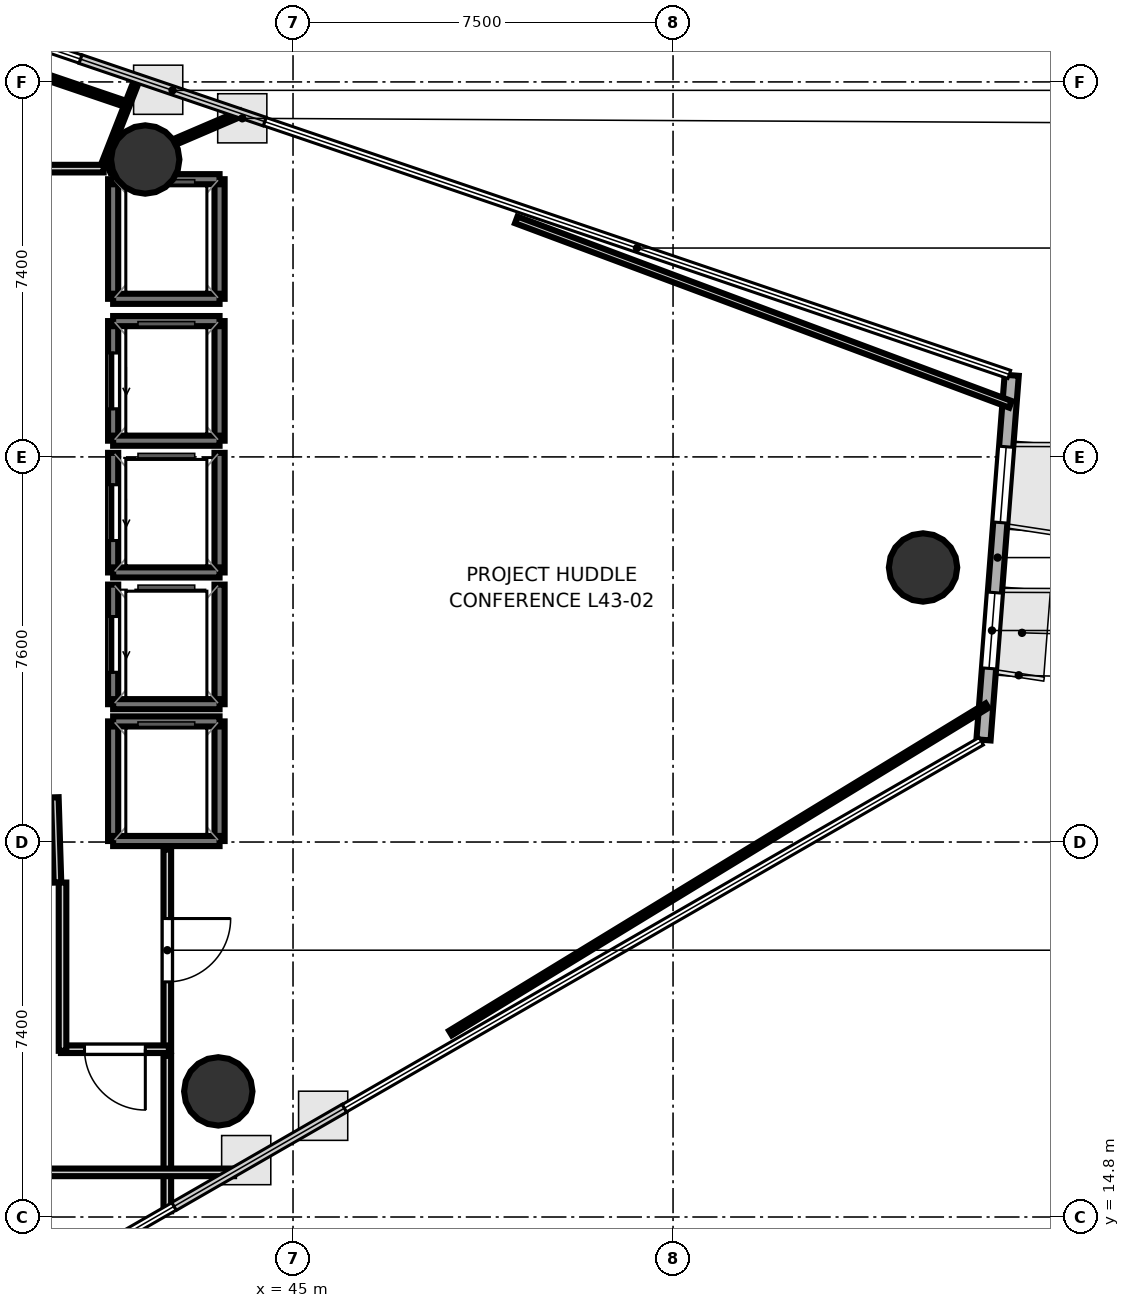
"""IFC4 building model, lengths in metres.
Left out: names, types, materials, properties, quantities, classifications, styles, units other than length and angle.
Written with IfcOpenShell. Run it as: python <this file> out.ifc"""

import sys

from ifc_helpers import new_model, si_unit, direction, frame, frame_2d, origin, origin_2d, place, context, subcontext, project, spatial, rectangle, hollow_circle, extrude, element, fill, save


model = new_model("IFC4")
c1 = context("Model", 3, precision=1e-05, world=origin(), true_north=direction((0.0, 1.0)))
c2 = subcontext(c1, "Body", "Model", "MODEL_VIEW")
j1 = project(units=[si_unit("LENGTHUNIT", "METRE"), si_unit("PLANEANGLEUNIT", "RADIAN")], contexts=[c1])
p1 = place(None, origin())
s1 = spatial("IfcSite", under=j1, at=p1, CompositionType="ELEMENT")
p2 = place(p1, origin())
s2 = spatial("IfcBuilding", under=s1, at=p2, CompositionType="ELEMENT")
p3 = place(p2, frame((0.0, 0.0, 169.8)))
s3 = spatial("IfcBuildingStorey", under=s2, at=p3, CompositionType="ELEMENT", Elevation=169.8)
for number, where, z_axis, x_axis in (
    (1, (57.434, 27.618, 0.0), (0.0, 0.0, 1.0), (1.0, 0.0, 0.0)),
    (2, (42.083, 35.669, 0.0), (0.0, 0.0, 1.0), (1.0, 0.0, 0.0)),
    (3, (43.525, 17.279, 0.0), (0.0, 0.0, 1.0), (1.0, 0.0, 0.0)),
):
    element("IfcColumn", number, at=place(p3, frame(where, z_axis=z_axis, x_axis=x_axis)), inside=s3, PredefinedType="COLUMN", context=c2, shape_type="SweptSolid", body=[
        extrude(hollow_circle(Radius=0.675, WallThickness=0.032, at=origin_2d()), origin(), (0.0, 0.0, 1.0), 3.7),
    ])
p4 = place(p3, frame((58.627, 24.215, 0.0), z_axis=(0.0, 0.0, 1.0), x_axis=(0.077128498834, 0.997021160592, 0.0)))
e4 = element("IfcWall", 4, at=p4, inside=s3, PredefinedType="SOLIDWALL", context=c2, shape_type="SweptSolid", body=[
    extrude(rectangle(XDim=7.217, YDim=0.28, at=frame_2d((3.608, 0.0))), origin(), (0.0, 0.0, 1.0), 3.52),
])
p5 = place(p4, frame((1.415, 0.0, 0.85)))
e5 = element("IfcOpeningElement", 5, at=p5, cuts=e4, PredefinedType="OPENING", context=c2, shape_type="SweptSolid", body=[
    extrude(rectangle(XDim=1.5, YDim=2.1, at=frame_2d((0.75, 1.05))), frame((0.0, 0.15, 0.0), z_axis=(0.0, -1.0, 0.0), x_axis=(1.0, 0.0, 0.0)), (0.0, 0.0, 1.0), 0.3),
])
p6 = place(p4, frame((4.302, 0.0, 0.85)))
e6 = element("IfcOpeningElement", 6, at=p6, cuts=e4, PredefinedType="OPENING", context=c2, shape_type="SweptSolid", body=[
    extrude(rectangle(XDim=1.5, YDim=2.1, at=frame_2d((0.75, 1.05))), frame((0.0, 0.15, 0.0), z_axis=(0.0, -1.0, 0.0), x_axis=(1.0, 0.0, 0.0)), (0.0, 0.0, 1.0), 0.3),
])
p7 = place(p3, frame((43.55, 30.12, 0.0), z_axis=(0.0, 0.0, 1.0), x_axis=(0.0, 1.0, 0.0)))
e7 = element("IfcWall", 7, at=p7, inside=s3, PredefinedType="SOLIDWALL", context=c2, shape_type="SweptSolid", body=[
    extrude(rectangle(XDim=2.36, YDim=0.2, at=frame_2d((1.18, 0.0))), origin(), (0.0, 0.0, 1.0), 3.52),
])
p8 = place(p3, frame((41.45, 30.12, 0.0), z_axis=(0.0, 0.0, 1.0), x_axis=(0.0, 1.0, 0.0)))
e8 = element("IfcWall", 8, at=p8, inside=s3, PredefinedType="SOLIDWALL", context=c2, shape_type="SweptSolid", body=[
    extrude(rectangle(XDim=2.36, YDim=0.2, at=frame_2d((1.18, 0.0))), origin(), (0.0, 0.0, 1.0), 3.52),
])
p9 = place(p8, frame((0.63, 0.0, 0.0)))
e9 = element("IfcOpeningElement", 9, at=p9, cuts=e8, PredefinedType="OPENING", context=c2, shape_type="SweptSolid", body=[
    extrude(rectangle(XDim=1.1, YDim=2.15, at=frame_2d((0.55, 1.075))), frame((0.0, 0.11, 0.0), z_axis=(0.0, -1.0, 0.0), x_axis=(1.0, 0.0, 0.0)), (0.0, 0.0, 1.0), 0.22),
])
for number, where, z_axis, x_axis in (
    (10, (41.45, 32.48, 0.0), (0.0, 0.0, 1.0), (1.0, 0.0, 0.0)),
    (11, (41.45, 30.12, 0.0), (0.0, 0.0, 1.0), (1.0, 0.0, 0.0)),
):
    element("IfcWall", number, at=place(p3, frame(where, z_axis=z_axis, x_axis=x_axis)), inside=s3, PredefinedType="SOLIDWALL", context=c2, shape_type="SweptSolid", body=[
        extrude(rectangle(XDim=2.1, YDim=0.2, at=frame_2d((1.05, 0.0))), origin(), (0.0, 0.0, 1.0), 3.52),
    ])
p10 = place(p3, frame((43.55, 27.52, 0.0), z_axis=(0.0, 0.0, 1.0), x_axis=(0.0, 1.0, 0.0)))
e12 = element("IfcWall", 12, at=p10, inside=s3, PredefinedType="SOLIDWALL", context=c2, shape_type="SweptSolid", body=[
    extrude(rectangle(XDim=2.36, YDim=0.2, at=frame_2d((1.18, 0.0))), origin(), (0.0, 0.0, 1.0), 3.52),
])
p11 = place(p3, frame((41.45, 27.52, 0.0), z_axis=(0.0, 0.0, 1.0), x_axis=(0.0, 1.0, 0.0)))
e13 = element("IfcWall", 13, at=p11, inside=s3, PredefinedType="SOLIDWALL", context=c2, shape_type="SweptSolid", body=[
    extrude(rectangle(XDim=2.36, YDim=0.2, at=frame_2d((1.18, 0.0))), origin(), (0.0, 0.0, 1.0), 3.52),
])
p12 = place(p11, frame((0.63, 0.0, 0.0)))
e14 = element("IfcOpeningElement", 14, at=p12, cuts=e13, PredefinedType="OPENING", context=c2, shape_type="SweptSolid", body=[
    extrude(rectangle(XDim=1.1, YDim=2.15, at=frame_2d((0.55, 1.075))), frame((0.0, 0.11, 0.0), z_axis=(0.0, -1.0, 0.0), x_axis=(1.0, 0.0, 0.0)), (0.0, 0.0, 1.0), 0.22),
])
p13 = place(p3, frame((41.45, 27.52, 0.0), z_axis=(0.0, 0.0, 1.0), x_axis=(1.0, 0.0, 0.0)))
e15 = element("IfcWall", 15, at=p13, inside=s3, PredefinedType="SOLIDWALL", context=c2, shape_type="SweptSolid", body=[
    extrude(rectangle(XDim=2.1, YDim=0.2, at=frame_2d((1.05, 0.0))), origin(), (0.0, 0.0, 1.0), 3.52),
])
p14 = place(p3, frame((43.55, 24.92, 0.0), z_axis=(0.0, 0.0, 1.0), x_axis=(0.0, 1.0, 0.0)))
e16 = element("IfcWall", 16, at=p14, inside=s3, PredefinedType="SOLIDWALL", context=c2, shape_type="SweptSolid", body=[
    extrude(rectangle(XDim=2.36, YDim=0.2, at=frame_2d((1.18, 0.0))), origin(), (0.0, 0.0, 1.0), 3.52),
])
p15 = place(p3, frame((41.45, 24.92, 0.0), z_axis=(0.0, 0.0, 1.0), x_axis=(0.0, 1.0, 0.0)))
e17 = element("IfcWall", 17, at=p15, inside=s3, PredefinedType="SOLIDWALL", context=c2, shape_type="SweptSolid", body=[
    extrude(rectangle(XDim=2.36, YDim=0.2, at=frame_2d((1.18, 0.0))), origin(), (0.0, 0.0, 1.0), 3.52),
])
p16 = place(p15, frame((0.63, 0.0, 0.0)))
e18 = element("IfcOpeningElement", 18, at=p16, cuts=e17, PredefinedType="OPENING", context=c2, shape_type="SweptSolid", body=[
    extrude(rectangle(XDim=1.1, YDim=2.15, at=frame_2d((0.55, 1.075))), frame((0.0, 0.11, 0.0), z_axis=(0.0, -1.0, 0.0), x_axis=(1.0, 0.0, 0.0)), (0.0, 0.0, 1.0), 0.22),
])
p17 = place(p3, frame((41.45, 24.92, 0.0), z_axis=(0.0, 0.0, 1.0), x_axis=(1.0, 0.0, 0.0)))
e19 = element("IfcWall", 19, at=p17, inside=s3, PredefinedType="SOLIDWALL", context=c2, shape_type="SweptSolid", body=[
    extrude(rectangle(XDim=2.1, YDim=0.2, at=frame_2d((1.05, 0.0))), origin(), (0.0, 0.0, 1.0), 3.52),
])
for number, where, z_axis, x_axis in (
    (20, (43.55, 22.22, 0.0), (0.0, 0.0, 1.0), (0.0, 1.0, 0.0)),
    (21, (41.45, 22.22, 0.0), (0.0, 0.0, 1.0), (0.0, 1.0, 0.0)),
):
    element("IfcWall", number, at=place(p3, frame(where, z_axis=z_axis, x_axis=x_axis)), inside=s3, PredefinedType="SOLIDWALL", context=c2, shape_type="SweptSolid", body=[
        extrude(rectangle(XDim=2.36, YDim=0.2, at=frame_2d((1.18, 0.0))), origin(), (0.0, 0.0, 1.0), 3.52),
    ])
for number, where, z_axis, x_axis in (
    (22, (41.45, 24.58, 0.0), (0.0, 0.0, 1.0), (1.0, 0.0, 0.0)),
    (23, (41.45, 22.22, 0.0), (0.0, 0.0, 1.0), (1.0, 0.0, 0.0)),
):
    element("IfcWall", number, at=place(p3, frame(where, z_axis=z_axis, x_axis=x_axis)), inside=s3, PredefinedType="SOLIDWALL", context=c2, shape_type="SweptSolid", body=[
        extrude(rectangle(XDim=2.1, YDim=0.2, at=frame_2d((1.05, 0.0))), origin(), (0.0, 0.0, 1.0), 3.52),
    ])
for number, where, z_axis, x_axis in (
    (24, (43.55, 32.92, 0.0), (0.0, 0.0, 1.0), (0.0, 1.0, 0.0)),
    (25, (41.45, 32.92, 0.0), (0.0, 0.0, 1.0), (0.0, 1.0, 0.0)),
):
    element("IfcWall", number, at=place(p3, frame(where, z_axis=z_axis, x_axis=x_axis)), inside=s3, PredefinedType="SOLIDWALL", context=c2, shape_type="SweptSolid", body=[
        extrude(rectangle(XDim=2.36, YDim=0.2, at=frame_2d((1.18, 0.0))), origin(), (0.0, 0.0, 1.0), 3.52),
    ])
for number, where, z_axis, x_axis in (
    (26, (41.45, 35.28, 0.0), (0.0, 0.0, 1.0), (1.0, 0.0, 0.0)),
    (27, (41.45, 32.92, 0.0), (0.0, 0.0, 1.0), (1.0, 0.0, 0.0)),
):
    element("IfcWall", number, at=place(p3, frame(where, z_axis=z_axis, x_axis=x_axis)), inside=s3, PredefinedType="SOLIDWALL", context=c2, shape_type="SweptSolid", body=[
        extrude(rectangle(XDim=2.1, YDim=0.2, at=frame_2d((1.05, 0.0))), origin(), (0.0, 0.0, 1.0), 3.52),
    ])
p18 = place(p3, frame((40.351, 21.401, 0.0), z_axis=(0.0, 0.0, 1.0), x_axis=(-0.031058045979, 0.999517582527, 0.0)))
e28 = element("IfcWall", 28, at=p18, inside=s3, PredefinedType="PARTITIONING", context=c2, shape_type="SweptSolid", body=[
    extrude(rectangle(XDim=1.682, YDim=0.15, at=frame_2d((0.841, 0.0))), origin(), (0.0, 0.0, 1.0), 2.84),
])
p19 = place(p3, frame((39.88, 35.489, 0.0), z_axis=(0.0, 0.0, 1.0), x_axis=(1.0, 0.0, 0.0)))
e29 = element("IfcWall", 29, at=p19, inside=s3, PredefinedType="PARTITIONING", context=c2, shape_type="SweptSolid", body=[
    extrude(rectangle(XDim=1.383, YDim=0.15, at=frame_2d((0.691, 0.0))), origin(), (0.0, 0.0, 1.0), 2.84),
])
p20 = place(p3, frame((42.519, 22.05, 0.0), z_axis=(0.0, 0.0, 1.0), x_axis=(0.0, -1.0, 0.0)))
e30 = element("IfcWall", 30, at=p20, inside=s3, PredefinedType="PARTITIONING", context=c2, shape_type="SweptSolid", body=[
    extrude(rectangle(XDim=3.97, YDim=0.15, at=frame_2d((1.985, 0.0))), origin(), (0.0, 0.0, 1.0), 2.84),
])
p21 = place(p20, frame((1.36, 0.0, 0.0)))
e31 = element("IfcOpeningElement", 31, at=p21, cuts=e30, PredefinedType="OPENING", context=c2, shape_type="SweptSolid", body=[
    extrude(rectangle(XDim=1.25, YDim=2.2, at=frame_2d((0.625, 1.1))), frame((0.0, 0.085, 0.0), z_axis=(0.0, -1.0, 0.0), x_axis=(1.0, 0.0, 0.0)), (0.0, 0.0, 1.0), 0.17),
])
p22 = place(p3, frame((42.55, 18.111, 0.0), z_axis=(0.0, 0.0, 1.0), x_axis=(-1.0, 0.0, 0.0)))
e32 = element("IfcWall", 32, at=p22, inside=s3, PredefinedType="PARTITIONING", context=c2, shape_type="SweptSolid", body=[
    extrude(rectangle(XDim=2.13, YDim=0.15, at=frame_2d((1.065, 0.0))), origin(), (0.0, 0.0, 1.0), 2.84),
])
p23 = place(p22, frame((0.465, 0.0, 0.0)))
e33 = element("IfcOpeningElement", 33, at=p23, cuts=e32, PredefinedType="OPENING", context=c2, shape_type="SweptSolid", body=[
    extrude(rectangle(XDim=1.2, YDim=2.15, at=frame_2d((0.6, 1.075))), frame((0.0, 0.085, 0.0), z_axis=(0.0, -1.0, 0.0), x_axis=(1.0, 0.0, 0.0)), (0.0, 0.0, 1.0), 0.17),
])
p24 = place(p3, frame((40.451, 18.08, 0.0), z_axis=(0.0, 0.0, 1.0), x_axis=(0.0, 1.0, 0.0)))
e34 = element("IfcWall", 34, at=p24, inside=s3, PredefinedType="PARTITIONING", context=c2, shape_type="SweptSolid", body=[
    extrude(rectangle(XDim=3.32, YDim=0.15, at=frame_2d((1.66, 0.0))), origin(), (0.0, 0.0, 1.0), 2.84),
])
p25 = place(p3, frame((42.519, 17.98, 0.0), z_axis=(0.0, 0.0, 1.0), x_axis=(0.0, -1.0, 0.0)))
e35 = element("IfcWall", 35, at=p25, inside=s3, PredefinedType="PARTITIONING", context=c2, shape_type="SweptSolid", body=[
    extrude(rectangle(XDim=3.067, YDim=0.15, at=frame_2d((1.533, 0.0))), origin(), (0.0, 0.0, 1.0), 2.84),
])
p26 = place(p3, frame((43.837, 15.681, 0.0), z_axis=(0.0, 0.0, 1.0), x_axis=(-1.0, 0.0, 0.0)))
e36 = element("IfcWall", 36, at=p26, inside=s3, PredefinedType="PARTITIONING", context=c2, shape_type="SweptSolid", body=[
    extrude(rectangle(XDim=15.437, YDim=0.15, at=frame_2d((7.719, 0.0))), origin(), (0.0, 0.0, 1.0), 2.84),
])
p27 = place(p26, frame((8.993, 0.0, 0.0)))
e37 = element("IfcOpeningElement", 37, at=p27, cuts=e36, PredefinedType="OPENING", context=c2, shape_type="SweptSolid", body=[
    extrude(rectangle(XDim=1.25, YDim=2.2, at=frame_2d((0.625, 1.1))), frame((0.0, 0.085, 0.0), z_axis=(0.0, -1.0, 0.0), x_axis=(1.0, 0.0, 0.0)), (0.0, 0.0, 1.0), 0.17),
])
p28 = place(p3, frame((43.969, 36.576, 0.0), z_axis=(0.0, 0.0, 1.0), x_axis=(-0.919028863482, -0.394190243521, 0.0)))
e38 = element("IfcWall", 38, at=p28, inside=s3, PredefinedType="PARTITIONING", context=c2, shape_type="SweptSolid", body=[
    extrude(rectangle(XDim=2.827, YDim=0.12, at=frame_2d((1.414, 0.0))), origin(), (0.0, 0.0, 1.0), 2.84),
])
p29 = place(p3, frame((41.273, 35.589, 0.0), z_axis=(0.0, 0.0, 1.0), x_axis=(0.365105724435, 0.930966062746, 0.0)))
e39 = element("IfcWall", 39, at=p29, inside=s3, PredefinedType="PARTITIONING", context=c2, shape_type="SweptSolid", body=[
    extrude(rectangle(XDim=1.824, YDim=0.105, at=frame_2d((0.912, 0.0))), origin(), (0.0, 0.0, 1.0), 2.84),
])
p30 = place(p3, frame((49.405, 34.477, 0.0), z_axis=(0.0, 0.0, 1.0), x_axis=(0.936892733085, -0.349616942799, 0.0)))
e40 = element("IfcWall", 40, at=p30, inside=s3, PredefinedType="PARTITIONING", context=c2, shape_type="SweptSolid", body=[
    extrude(rectangle(XDim=10.41, YDim=0.14, at=frame_2d((5.205, 0.0))), origin(), (0.0, 0.0, 1.0), 2.84),
])
p31 = place(p3, frame((58.696, 24.891, 0.0), z_axis=(0.0, 0.0, 1.0), x_axis=(-0.853648476831, -0.520849573297, 0.0)))
e41 = element("IfcWall", 41, at=p31, inside=s3, PredefinedType="PARTITIONING", context=c2, shape_type="SweptSolid", body=[
    extrude(rectangle(XDim=12.404, YDim=0.105, at=frame_2d((6.202, 0.0))), origin(), (0.0, 0.0, 1.0), 2.84),
])
p32 = place(p3, frame((37.22, 38.286, 0.0), z_axis=(0.0, 0.0, 1.0), x_axis=(0.946917915535, -0.321475444224, 0.0)))
e42 = element("IfcWall", 42, at=p32, inside=s3, PredefinedType="PARTITIONING", context=c2, shape_type="SweptSolid", body=[
    extrude(rectangle(XDim=4.671, YDim=0.12, at=frame_2d((2.336, 0.0))), origin(), (0.0, 0.0, 1.0), 2.84),
])
p33 = place(p9, origin())
e43 = element("IfcDoor", 43, at=p33, inside=s3, OperationType="SLIDING_TO_LEFT", PredefinedType="DOOR", context=c2, shape_type="SweptSolid", body=[
    extrude(rectangle(XDim=1.1, YDim=2.15, at=frame_2d((0.55, 1.075))), frame((0.0, 0.025, 0.0), z_axis=(0.0, -1.0, 0.0), x_axis=(1.0, 0.0, 0.0)), (0.0, 0.0, 1.0), 0.05),
])
fill(e9, e43)
p34 = place(p12, origin())
e44 = element("IfcDoor", 44, at=p34, inside=s3, OperationType="SLIDING_TO_LEFT", PredefinedType="DOOR", context=c2, shape_type="SweptSolid", body=[
    extrude(rectangle(XDim=1.1, YDim=2.15, at=frame_2d((0.55, 1.075))), frame((0.0, 0.025, 0.0), z_axis=(0.0, -1.0, 0.0), x_axis=(1.0, 0.0, 0.0)), (0.0, 0.0, 1.0), 0.05),
])
fill(e14, e44)
p35 = place(p16, origin())
e45 = element("IfcDoor", 45, at=p35, inside=s3, OperationType="SLIDING_TO_LEFT", PredefinedType="DOOR", context=c2, shape_type="SweptSolid", body=[
    extrude(rectangle(XDim=1.1, YDim=2.15, at=frame_2d((0.55, 1.075))), frame((0.0, 0.025, 0.0), z_axis=(0.0, -1.0, 0.0), x_axis=(1.0, 0.0, 0.0)), (0.0, 0.0, 1.0), 0.05),
])
fill(e18, e45)
p36 = place(p23, origin())
e46 = element("IfcDoor", 46, at=p36, inside=s3, OperationType="SINGLE_SWING_LEFT", PredefinedType="DOOR", context=c2, shape_type="SweptSolid", body=[
    extrude(rectangle(XDim=1.2, YDim=2.15, at=frame_2d((0.6, 1.075))), frame((0.0, 0.025, 0.0), z_axis=(0.0, -1.0, 0.0), x_axis=(1.0, 0.0, 0.0)), (0.0, 0.0, 1.0), 0.05),
])
fill(e33, e46)
p37 = place(p21, origin())
e47 = element("IfcDoor", 47, at=p37, inside=s3, OperationType="SINGLE_SWING_LEFT", PredefinedType="DOOR", context=c2, shape_type="SweptSolid", body=[
    extrude(rectangle(XDim=1.25, YDim=2.2, at=frame_2d((0.625, 1.1))), frame((0.0, 0.025, 0.0), z_axis=(0.0, -1.0, 0.0), x_axis=(1.0, 0.0, 0.0)), (0.0, 0.0, 1.0), 0.05),
])
fill(e31, e47)
p38 = place(p5, origin())
e48 = element("IfcWindow", 48, at=p38, inside=s3, PartitioningType="SINGLE_PANEL", PredefinedType="WINDOW", context=c2, shape_type="SweptSolid", body=[
    extrude(rectangle(XDim=1.5, YDim=2.1, at=frame_2d((0.75, 1.05))), frame((0.0, 0.03, 0.0), z_axis=(0.0, -1.0, 0.0), x_axis=(1.0, 0.0, 0.0)), (0.0, 0.0, 1.0), 0.06),
])
fill(e5, e48)
p39 = place(p6, origin())
e49 = element("IfcWindow", 49, at=p39, inside=s3, PartitioningType="SINGLE_PANEL", PredefinedType="WINDOW", context=c2, shape_type="SweptSolid", body=[
    extrude(rectangle(XDim=1.5, YDim=2.1, at=frame_2d((0.75, 1.05))), frame((0.0, 0.03, 0.0), z_axis=(0.0, -1.0, 0.0), x_axis=(1.0, 0.0, 0.0)), (0.0, 0.0, 1.0), 0.06),
])
fill(e6, e49)
save(model, sys.argv[1])
